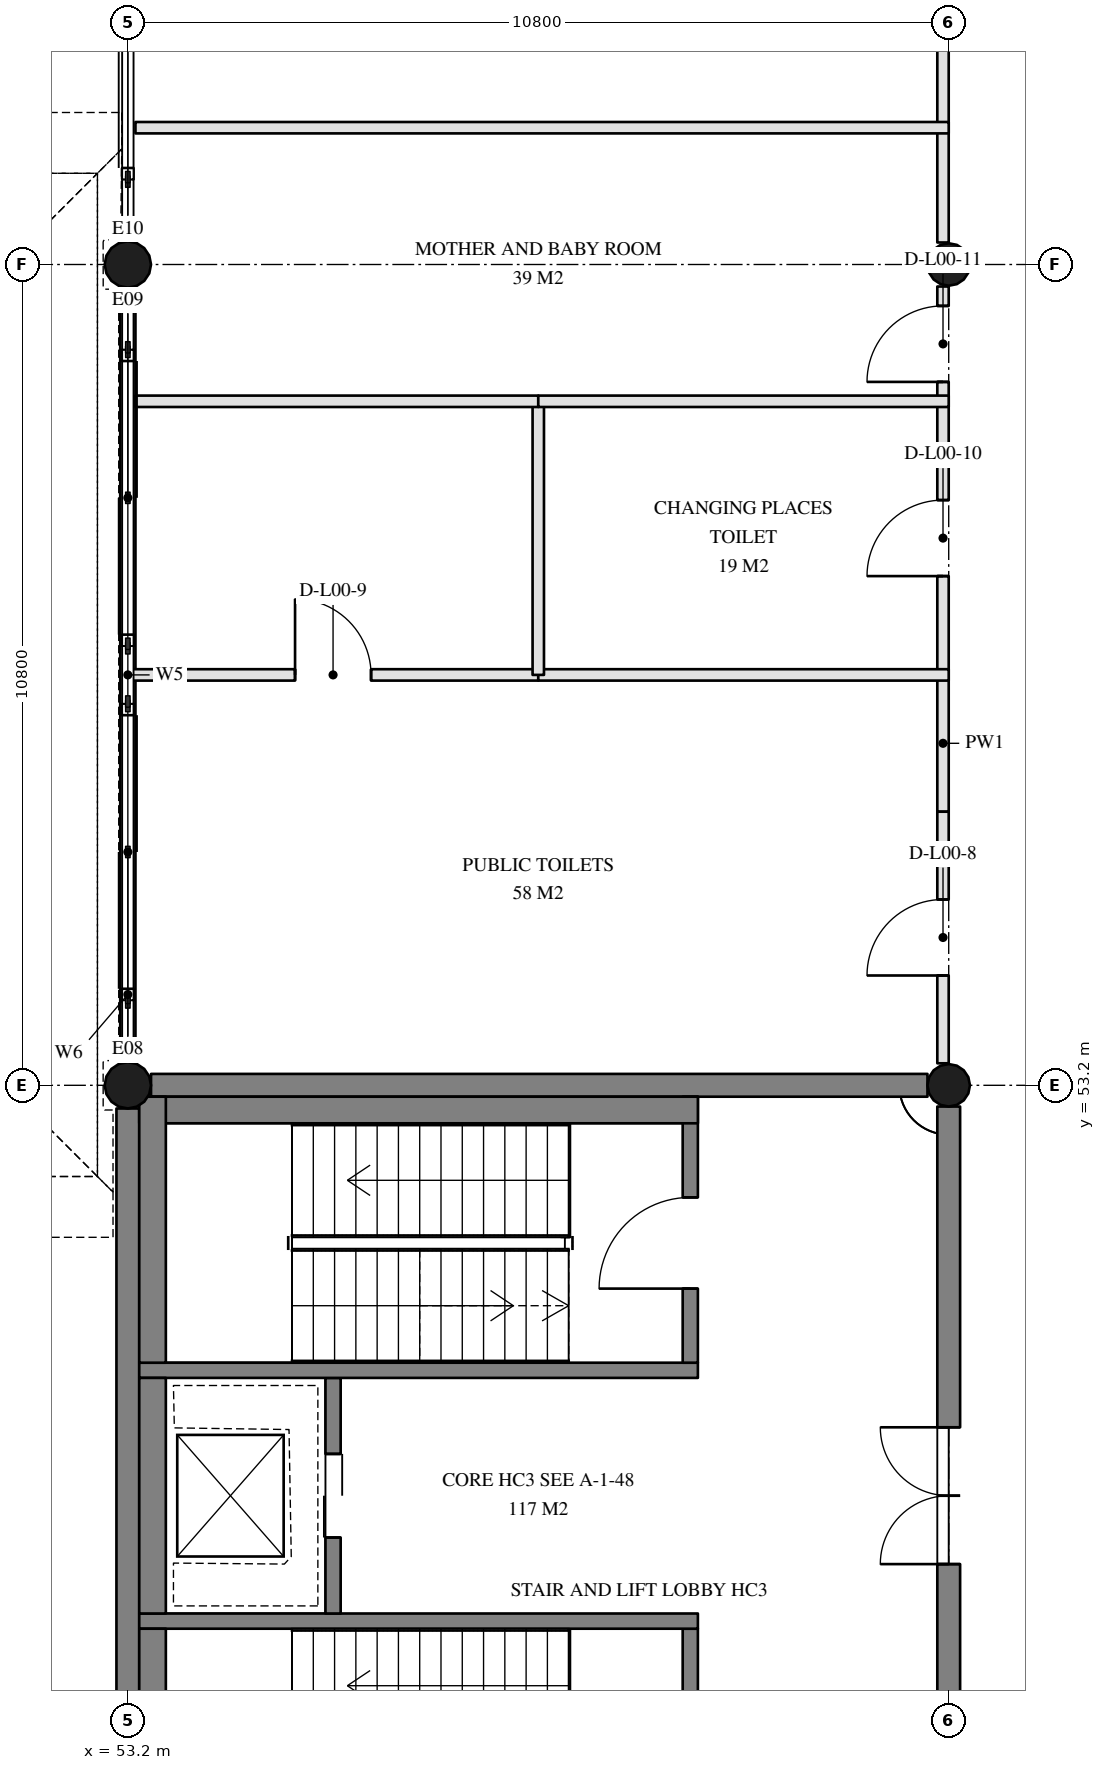
"""IFC4 building model, lengths in metres.
Left out: names, types, materials, properties, quantities, classifications, styles, units other than length and angle.
Written with IfcOpenShell. Run it as: python <this file> out.ifc"""

import sys

from ifc_helpers import new_model, si_unit, direction, frame, frame_2d, origin, origin_2d, place, context, subcontext, project, spatial, rectangle, hollow_circle, extrude, element, fill, save


model = new_model("IFC4")
c1 = context("Model", 3, precision=1e-05, world=origin(), true_north=direction((0.0, 1.0)))
c2 = subcontext(c1, "Body", "Model", "MODEL_VIEW")
j1 = project(units=[si_unit("LENGTHUNIT", "METRE"), si_unit("PLANEANGLEUNIT", "RADIAN")], contexts=[c1])
p1 = place(None, origin())
s1 = spatial("IfcSite", under=j1, at=p1, CompositionType="ELEMENT")
p2 = place(p1, origin())
s2 = spatial("IfcBuilding", under=s1, at=p2, CompositionType="ELEMENT")
p3 = place(p2, origin())
s3 = spatial("IfcBuildingStorey", under=s2, at=p3, CompositionType="ELEMENT", Elevation=0.0)
for number, where, z_axis, x_axis in (
    (1, (53.2, 53.2, 0.0), (0.0, 0.0, 1.0), (1.0, 0.0, 0.0)),
    (2, (53.2, 64.0, 0.0), (0.0, 0.0, 1.0), (1.0, 0.0, 0.0)),
):
    element("IfcColumn", number, at=place(p3, frame(where, z_axis=z_axis, x_axis=x_axis)), inside=s3, PredefinedType="COLUMN", context=c2, shape_type="SweptSolid", body=[
        extrude(hollow_circle(Radius=0.305, WallThickness=0.025, at=origin_2d()), origin(), (0.0, 0.0, 1.0), 4.8),
    ])
for number, where, z_axis, x_axis in (
    (3, (64.0, 53.2, 0.0), (0.0, 0.0, 1.0), (1.0, 0.0, 0.0)),
    (4, (64.0, 64.0, 0.0), (0.0, 0.0, 1.0), (1.0, 0.0, 0.0)),
):
    element("IfcColumn", number, at=place(p3, frame(where, z_axis=z_axis, x_axis=x_axis)), inside=s3, PredefinedType="COLUMN", context=c2, shape_type="SweptSolid", body=[
        extrude(hollow_circle(Radius=0.28, WallThickness=0.02, at=origin_2d()), origin(), (0.0, 0.0, 1.0), 4.8),
    ])
p4 = place(p3, frame((64.0, 42.705, 0.0), z_axis=(0.0, 0.0, 1.0), x_axis=(0.0, 1.0, 0.0)))
e5 = element("IfcWall", 5, at=p4, inside=s3, PredefinedType="SOLIDWALL", context=c2, shape_type="SweptSolid", body=[
    extrude(rectangle(XDim=10.215, YDim=0.3, at=frame_2d((5.108, 0.0))), origin(), (0.0, 0.0, 1.0), 4.8),
])
p5 = place(p4, frame((4.195, 0.0, 0.0)))
e6 = element("IfcOpeningElement", 6, at=p5, cuts=e5, PredefinedType="OPENING", context=c2, shape_type="SweptSolid", body=[
    extrude(rectangle(XDim=1.8, YDim=2.1, at=frame_2d((0.9, 1.05))), frame((0.0, 0.16, 0.0), z_axis=(0.0, -1.0, 0.0), x_axis=(1.0, 0.0, 0.0)), (0.0, 0.0, 1.0), 0.32),
])
p6 = place(p3, frame((63.72, 53.2, 0.0), z_axis=(0.0, 0.0, 1.0), x_axis=(-1.0, 0.0, 0.0)))
e7 = element("IfcWall", 7, at=p6, inside=s3, PredefinedType="SOLIDWALL", context=c2, shape_type="SweptSolid", body=[
    extrude(rectangle(XDim=10.216, YDim=0.3, at=frame_2d((5.108, 0.0))), origin(), (0.0, 0.0, 1.0), 4.8),
])
p7 = place(p3, frame((53.2, 52.895, 0.0), z_axis=(0.0, 0.0, 1.0), x_axis=(0.0, -1.0, 0.0)))
e8 = element("IfcWall", 8, at=p7, inside=s3, PredefinedType="SOLIDWALL", context=c2, shape_type="SweptSolid", body=[
    extrude(rectangle(XDim=10.19, YDim=0.3, at=frame_2d((5.095, 0.0))), origin(), (0.0, 0.0, 1.0), 4.8),
])
p8 = place(p3, frame((53.2, 53.48, 4.5), z_axis=(0.0, 0.0, 1.0), x_axis=(0.0, 1.0, 0.0)))
e9 = element("IfcWall", 9, at=p8, inside=s3, PredefinedType="SOLIDWALL", context=c2, shape_type="SweptSolid", body=[
    extrude(rectangle(XDim=10.24, YDim=0.2, at=frame_2d((5.12, 0.0))), origin(), (0.0, 0.0, 1.0), 0.3),
])
p9 = place(p3, frame((53.2, 54.32, 0.0), z_axis=(0.0, 0.0, 1.0), x_axis=(0.0, 1.0, 0.0)))
e10 = element("IfcWall", 10, at=p9, inside=s3, PredefinedType="SOLIDWALL", context=c2, shape_type="SweptSolid", body=[
    extrude(rectangle(XDim=3.9, YDim=0.15, at=frame_2d((1.95, 0.0))), origin(), (0.0, 0.0, 1.0), 2.6),
])
p10 = place(p9, frame((0.15, 0.0, 0.0)))
e11 = element("IfcOpeningElement", 11, at=p10, cuts=e10, PredefinedType="OPENING", context=c2, shape_type="SweptSolid", body=[
    extrude(rectangle(XDim=3.6, YDim=2.4, at=frame_2d((1.8, 1.2))), frame((0.0, 0.085, 0.0), z_axis=(0.0, -1.0, 0.0), x_axis=(1.0, 0.0, 0.0)), (0.0, 0.0, 1.0), 0.17),
])
p11 = place(p3, frame((53.2, 58.98, 0.0), z_axis=(0.0, 0.0, 1.0), x_axis=(0.0, 1.0, 0.0)))
e12 = element("IfcWall", 12, at=p11, inside=s3, PredefinedType="SOLIDWALL", context=c2, shape_type="SweptSolid", body=[
    extrude(rectangle(XDim=3.9, YDim=0.15, at=frame_2d((1.95, 0.0))), origin(), (0.0, 0.0, 1.0), 2.6),
])
p12 = place(p11, frame((0.15, 0.0, 0.0)))
e13 = element("IfcOpeningElement", 13, at=p12, cuts=e12, PredefinedType="OPENING", context=c2, shape_type="SweptSolid", body=[
    extrude(rectangle(XDim=3.6, YDim=2.4, at=frame_2d((1.8, 1.2))), frame((0.0, 0.085, 0.0), z_axis=(0.0, -1.0, 0.0), x_axis=(1.0, 0.0, 0.0)), (0.0, 0.0, 1.0), 0.17),
])
p13 = place(p3, frame((53.2, 65.12, 0.0), z_axis=(0.0, 0.0, 1.0), x_axis=(0.0, 1.0, 0.0)))
e14 = element("IfcWall", 14, at=p13, inside=s3, PredefinedType="SOLIDWALL", context=c2, shape_type="SweptSolid", body=[
    extrude(rectangle(XDim=3.9, YDim=0.15, at=frame_2d((1.95, 0.0))), origin(), (0.0, 0.0, 1.0), 2.6),
])
p14 = place(p13, frame((0.15, 0.0, 0.0)))
e15 = element("IfcOpeningElement", 15, at=p14, cuts=e14, PredefinedType="OPENING", context=c2, shape_type="SweptSolid", body=[
    extrude(rectangle(XDim=3.6, YDim=2.4, at=frame_2d((1.8, 1.2))), frame((0.0, 0.085, 0.0), z_axis=(0.0, -1.0, 0.0), x_axis=(1.0, 0.0, 0.0)), (0.0, 0.0, 1.0), 0.17),
])
p15 = place(p3, frame((60.6, 42.55, 0.0), z_axis=(0.0, 0.0, 1.0), x_axis=(0.0, 1.0, 0.0)))
e16 = element("IfcWall", 16, at=p15, inside=s3, PredefinedType="SOLIDWALL", context=c2, shape_type="SweptSolid", body=[
    extrude(rectangle(XDim=3.5, YDim=0.2, at=frame_2d((1.75, 0.0))), origin(), (0.0, 0.0, 1.0), 4.4),
])
p16 = place(p15, frame((1.325, 0.0, 0.0)))
e17 = element("IfcOpeningElement", 17, at=p16, cuts=e16, PredefinedType="OPENING", context=c2, shape_type="SweptSolid", body=[
    extrude(rectangle(XDim=1.2, YDim=2.1, at=frame_2d((0.6, 1.05))), frame((0.0, 0.11, 0.0), z_axis=(0.0, -1.0, 0.0), x_axis=(1.0, 0.0, 0.0)), (0.0, 0.0, 1.0), 0.22),
])
p17 = place(p3, frame((60.7, 46.15, 0.0), z_axis=(0.0, 0.0, 1.0), x_axis=(-1.0, 0.0, 0.0)))
e18 = element("IfcWall", 18, at=p17, inside=s3, PredefinedType="SOLIDWALL", context=c2, shape_type="SweptSolid", body=[
    extrude(rectangle(XDim=7.35, YDim=0.2, at=frame_2d((3.675, 0.0))), origin(), (0.0, 0.0, 1.0), 4.4),
])
p18 = place(p3, frame((55.9, 46.25, 0.0), z_axis=(0.0, 0.0, 1.0), x_axis=(0.0, 1.0, 0.0)))
e19 = element("IfcWall", 19, at=p18, inside=s3, PredefinedType="SOLIDWALL", context=c2, shape_type="SweptSolid", body=[
    extrude(rectangle(XDim=3.1, YDim=0.2, at=frame_2d((1.55, 0.0))), origin(), (0.0, 0.0, 1.0), 4.4),
])
p19 = place(p18, frame((1.0, 0.0, 0.0)))
e20 = element("IfcOpeningElement", 20, at=p19, cuts=e19, PredefinedType="OPENING", context=c2, shape_type="SweptSolid", body=[
    extrude(rectangle(XDim=1.1, YDim=2.1, at=frame_2d((0.55, 1.05))), frame((0.0, 0.11, 0.0), z_axis=(0.0, -1.0, 0.0), x_axis=(1.0, 0.0, 0.0)), (0.0, 0.0, 1.0), 0.22),
])
p20 = place(p3, frame((60.7, 49.45, 0.0), z_axis=(0.0, 0.0, 1.0), x_axis=(-1.0, 0.0, 0.0)))
e21 = element("IfcWall", 21, at=p20, inside=s3, PredefinedType="SOLIDWALL", context=c2, shape_type="SweptSolid", body=[
    extrude(rectangle(XDim=7.35, YDim=0.2, at=frame_2d((3.675, 0.0))), origin(), (0.0, 0.0, 1.0), 4.4),
])
p21 = place(p3, frame((60.6, 49.55, 0.0), z_axis=(0.0, 0.0, 1.0), x_axis=(0.0, 1.0, 0.0)))
e22 = element("IfcWall", 22, at=p21, inside=s3, PredefinedType="SOLIDWALL", context=c2, shape_type="SweptSolid", body=[
    extrude(rectangle(XDim=3.5, YDim=0.2, at=frame_2d((1.75, 0.0))), origin(), (0.0, 0.0, 1.0), 4.4),
])
p22 = place(p21, frame((0.975, 0.0, 0.0)))
e23 = element("IfcOpeningElement", 23, at=p22, cuts=e22, PredefinedType="OPENING", context=c2, shape_type="SweptSolid", body=[
    extrude(rectangle(XDim=1.2, YDim=2.1, at=frame_2d((0.6, 1.05))), frame((0.0, 0.11, 0.0), z_axis=(0.0, -1.0, 0.0), x_axis=(1.0, 0.0, 0.0)), (0.0, 0.0, 1.0), 0.22),
])
p23 = place(p3, frame((53.525, 42.55, -0.6), z_axis=(0.0, 0.0, 1.0), x_axis=(0.0, 1.0, 0.0)))
e24 = element("IfcWall", 24, at=p23, inside=s3, PredefinedType="SOLIDWALL", context=c2, shape_type="SweptSolid", body=[
    extrude(rectangle(XDim=3.5, YDim=0.35, at=frame_2d((1.75, 0.0))), origin(), (0.0, 0.0, 1.0), 5.0),
])
p24 = place(p3, frame((60.7, 52.875, -0.6), z_axis=(0.0, 0.0, 1.0), x_axis=(-1.0, 0.0, 0.0)))
e25 = element("IfcWall", 25, at=p24, inside=s3, PredefinedType="SOLIDWALL", context=c2, shape_type="SweptSolid", body=[
    extrude(rectangle(XDim=7.35, YDim=0.35, at=frame_2d((3.675, 0.0))), origin(), (0.0, 0.0, 1.0), 5.0),
])
p25 = place(p3, frame((53.525, 49.55, -0.6), z_axis=(0.0, 0.0, 1.0), x_axis=(0.0, 1.0, 0.0)))
e26 = element("IfcWall", 26, at=p25, inside=s3, PredefinedType="SOLIDWALL", context=c2, shape_type="SweptSolid", body=[
    extrude(rectangle(XDim=3.5, YDim=0.35, at=frame_2d((1.75, 0.0))), origin(), (0.0, 0.0, 1.0), 5.0),
])
p26 = place(p3, frame((53.525, 46.25, -0.6), z_axis=(0.0, 0.0, 1.0), x_axis=(0.0, 1.0, 0.0)))
e27 = element("IfcWall", 27, at=p26, inside=s3, PredefinedType="SOLIDWALL", context=c2, shape_type="SweptSolid", body=[
    extrude(rectangle(XDim=3.1, YDim=0.35, at=frame_2d((1.55, 0.0))), origin(), (0.0, 0.0, 1.0), 5.0),
])
p27 = place(p3, frame((63.925, 56.8, 0.0), z_axis=(0.0, 0.0, 1.0), x_axis=(0.0, 1.0, 0.0)))
e28 = element("IfcWall", 28, at=p27, inside=s3, PredefinedType="PARTITIONING", context=c2, shape_type="SweptSolid", body=[
    extrude(rectangle(XDim=1.8, YDim=0.15, at=frame_2d((0.9, 0.0))), origin(), (0.0, 0.0, 1.0), 3.9),
])
p28 = place(p3, frame((63.925, 58.6, 0.0), z_axis=(0.0, 0.0, 1.0), x_axis=(0.0, 1.0, 0.0)))
e29 = element("IfcWall", 29, at=p28, inside=s3, PredefinedType="PARTITIONING", context=c2, shape_type="SweptSolid", body=[
    extrude(rectangle(XDim=3.6, YDim=0.15, at=frame_2d((1.8, 0.0))), origin(), (0.0, 0.0, 1.0), 3.9),
])
p29 = place(p28, frame((1.3, 0.0, 0.0)))
e30 = element("IfcOpeningElement", 30, at=p29, cuts=e29, PredefinedType="OPENING", context=c2, shape_type="SweptSolid", body=[
    extrude(rectangle(XDim=1.0, YDim=2.1, at=frame_2d((0.5, 1.05))), frame((0.0, 0.085, 0.0), z_axis=(0.0, -1.0, 0.0), x_axis=(1.0, 0.0, 0.0)), (0.0, 0.0, 1.0), 0.17),
])
p30 = place(p3, frame((63.925, 62.2, 0.0), z_axis=(0.0, 0.0, 1.0), x_axis=(0.0, 1.0, 0.0)))
e31 = element("IfcWall", 31, at=p30, inside=s3, PredefinedType="PARTITIONING", context=c2, shape_type="SweptSolid", body=[
    extrude(rectangle(XDim=1.51, YDim=0.15, at=frame_2d((0.755, 0.0))), origin(), (0.0, 0.0, 1.0), 3.9),
])
p31 = place(p30, frame((0.255, 0.0, 0.0)))
e32 = element("IfcOpeningElement", 32, at=p31, cuts=e31, PredefinedType="OPENING", context=c2, shape_type="SweptSolid", body=[
    extrude(rectangle(XDim=1.0, YDim=2.1, at=frame_2d((0.5, 1.05))), frame((0.0, 0.085, 0.0), z_axis=(0.0, -1.0, 0.0), x_axis=(1.0, 0.0, 0.0)), (0.0, 0.0, 1.0), 0.17),
])
p32 = place(p3, frame((63.925, 53.49, 0.0), z_axis=(0.0, 0.0, 1.0), x_axis=(0.0, 1.0, 0.0)))
e33 = element("IfcWall", 33, at=p32, inside=s3, PredefinedType="PARTITIONING", context=c2, shape_type="SweptSolid", body=[
    extrude(rectangle(XDim=3.311, YDim=0.15, at=frame_2d((1.655, 0.0))), origin(), (0.0, 0.0, 1.0), 3.9),
])
p33 = place(p32, frame((1.155, 0.0, 0.0)))
e34 = element("IfcOpeningElement", 34, at=p33, cuts=e33, PredefinedType="OPENING", context=c2, shape_type="SweptSolid", body=[
    extrude(rectangle(XDim=1.0, YDim=2.1, at=frame_2d((0.5, 1.05))), frame((0.0, 0.085, 0.0), z_axis=(0.0, -1.0, 0.0), x_axis=(1.0, 0.0, 0.0)), (0.0, 0.0, 1.0), 0.17),
])
p34 = place(p3, frame((63.925, 64.29, 0.0), z_axis=(0.0, 0.0, 1.0), x_axis=(0.0, 1.0, 0.0)))
e35 = element("IfcWall", 35, at=p34, inside=s3, PredefinedType="PARTITIONING", context=c2, shape_type="SweptSolid", body=[
    extrude(rectangle(XDim=1.51, YDim=0.15, at=frame_2d((0.755, 0.0))), origin(), (0.0, 0.0, 1.0), 3.9),
])
p35 = place(p3, frame((63.925, 65.8, 0.0), z_axis=(0.0, 0.0, 1.0), x_axis=(0.0, 1.0, 0.0)))
e36 = element("IfcWall", 36, at=p35, inside=s3, PredefinedType="PARTITIONING", context=c2, shape_type="SweptSolid", body=[
    extrude(rectangle(XDim=8.684, YDim=0.15, at=frame_2d((4.342, 0.0))), origin(), (0.0, 0.0, 1.0), 3.9),
])
p36 = place(p35, frame((3.842, 0.0, 0.0)))
e37 = element("IfcOpeningElement", 37, at=p36, cuts=e36, PredefinedType="OPENING", context=c2, shape_type="SweptSolid", body=[
    extrude(rectangle(XDim=1.0, YDim=2.1, at=frame_2d((0.5, 1.05))), frame((0.0, 0.085, 0.0), z_axis=(0.0, -1.0, 0.0), x_axis=(1.0, 0.0, 0.0)), (0.0, 0.0, 1.0), 0.17),
])
p37 = place(p3, frame((53.2, 58.6, 0.0), z_axis=(0.0, 0.0, 1.0), x_axis=(1.0, 0.0, 0.0)))
e38 = element("IfcWall", 38, at=p37, inside=s3, PredefinedType="PARTITIONING", context=c2, shape_type="SweptSolid", body=[
    extrude(rectangle(XDim=5.4, YDim=0.15, at=frame_2d((2.7, 0.0))), origin(), (0.0, 0.0, 1.0), 3.9),
])
p38 = place(p37, frame((2.2, 0.0, 0.0)))
e39 = element("IfcOpeningElement", 39, at=p38, cuts=e38, PredefinedType="OPENING", context=c2, shape_type="SweptSolid", body=[
    extrude(rectangle(XDim=1.0, YDim=2.1, at=frame_2d((0.5, 1.05))), frame((0.0, 0.085, 0.0), z_axis=(0.0, -1.0, 0.0), x_axis=(1.0, 0.0, 0.0)), (0.0, 0.0, 1.0), 0.17),
])
p39 = place(p3, frame((58.6, 58.6, 0.0), z_axis=(0.0, 0.0, 1.0), x_axis=(1.0, 0.0, 0.0)))
e40 = element("IfcWall", 40, at=p39, inside=s3, PredefinedType="PARTITIONING", context=c2, shape_type="SweptSolid", body=[
    extrude(rectangle(XDim=5.4, YDim=0.15, at=frame_2d((2.7, 0.0))), origin(), (0.0, 0.0, 1.0), 3.9),
])
p40 = place(p3, frame((58.6, 58.6, 0.0), z_axis=(0.0, 0.0, 1.0), x_axis=(0.0, 1.0, 0.0)))
e41 = element("IfcWall", 41, at=p40, inside=s3, PredefinedType="PARTITIONING", context=c2, shape_type="SweptSolid", body=[
    extrude(rectangle(XDim=3.6, YDim=0.15, at=frame_2d((1.8, 0.0))), origin(), (0.0, 0.0, 1.0), 4.4),
])
p41 = place(p3, frame((53.3, 62.2, 0.0), z_axis=(0.0, 0.0, 1.0), x_axis=(1.0, 0.0, 0.0)))
e42 = element("IfcWall", 42, at=p41, inside=s3, PredefinedType="PARTITIONING", context=c2, shape_type="SweptSolid", body=[
    extrude(rectangle(XDim=5.3, YDim=0.15, at=frame_2d((2.65, 0.0))), origin(), (0.0, 0.0, 1.0), 3.9),
])
p42 = place(p3, frame((58.6, 62.2, 0.0), z_axis=(0.0, 0.0, 1.0), x_axis=(1.0, 0.0, 0.0)))
e43 = element("IfcWall", 43, at=p42, inside=s3, PredefinedType="PARTITIONING", context=c2, shape_type="SweptSolid", body=[
    extrude(rectangle(XDim=5.4, YDim=0.15, at=frame_2d((2.7, 0.0))), origin(), (0.0, 0.0, 1.0), 3.9),
])
p43 = place(p3, frame((53.3, 65.8, 0.0), z_axis=(0.0, 0.0, 1.0), x_axis=(1.0, 0.0, 0.0)))
e44 = element("IfcWall", 44, at=p43, inside=s3, PredefinedType="PARTITIONING", context=c2, shape_type="SweptSolid", body=[
    extrude(rectangle(XDim=10.7, YDim=0.15, at=frame_2d((5.35, 0.0))), origin(), (0.0, 0.0, 1.0), 3.9),
])
p44 = place(p10, origin())
e45 = element("IfcDoor", 45, at=p44, inside=s3, OperationType="DOUBLE_DOOR_SLIDING", PredefinedType="DOOR", context=c2, shape_type="SweptSolid", body=[
    extrude(rectangle(XDim=3.6, YDim=2.4, at=frame_2d((1.8, 1.2))), frame((0.0, 0.025, 0.0), z_axis=(0.0, -1.0, 0.0), x_axis=(1.0, 0.0, 0.0)), (0.0, 0.0, 1.0), 0.05),
])
fill(e11, e45)
p45 = place(p12, origin())
e46 = element("IfcDoor", 46, at=p45, inside=s3, OperationType="DOUBLE_DOOR_SLIDING", PredefinedType="DOOR", context=c2, shape_type="SweptSolid", body=[
    extrude(rectangle(XDim=3.6, YDim=2.4, at=frame_2d((1.8, 1.2))), frame((0.0, 0.025, 0.0), z_axis=(0.0, -1.0, 0.0), x_axis=(1.0, 0.0, 0.0)), (0.0, 0.0, 1.0), 0.05),
])
fill(e13, e46)
p46 = place(p14, origin())
e47 = element("IfcDoor", 47, at=p46, inside=s3, OperationType="DOUBLE_DOOR_SLIDING", PredefinedType="DOOR", context=c2, shape_type="SweptSolid", body=[
    extrude(rectangle(XDim=3.6, YDim=2.4, at=frame_2d((1.8, 1.2))), frame((0.0, 0.025, 0.0), z_axis=(0.0, -1.0, 0.0), x_axis=(1.0, 0.0, 0.0)), (0.0, 0.0, 1.0), 0.05),
])
fill(e15, e47)
p47 = place(p19, frame((1.1, 0.0, 0.0), z_axis=(0.0, 0.0, 1.0), x_axis=(-1.0, 0.0, 0.0)))
e48 = element("IfcDoor", 48, at=p47, inside=s3, OperationType="DOUBLE_DOOR_SLIDING", PredefinedType="DOOR", context=c2, shape_type="SweptSolid", body=[
    extrude(rectangle(XDim=1.1, YDim=2.1, at=frame_2d((0.55, 1.05))), frame((0.0, 0.025, 0.0), z_axis=(0.0, -1.0, 0.0), x_axis=(1.0, 0.0, 0.0)), (0.0, 0.0, 1.0), 0.05),
])
fill(e20, e48)
p48 = place(p22, frame((1.2, 0.0, 0.0), z_axis=(0.0, 0.0, 1.0), x_axis=(-1.0, 0.0, 0.0)))
e49 = element("IfcDoor", 49, at=p48, inside=s3, OperationType="SINGLE_SWING_RIGHT", PredefinedType="DOOR", context=c2, shape_type="SweptSolid", body=[
    extrude(rectangle(XDim=1.2, YDim=2.1, at=frame_2d((0.6, 1.05))), frame((0.0, 0.025, 0.0), z_axis=(0.0, -1.0, 0.0), x_axis=(1.0, 0.0, 0.0)), (0.0, 0.0, 1.0), 0.05),
])
fill(e23, e49)
p49 = place(p5, frame((1.8, 0.0, 0.0), z_axis=(0.0, 0.0, 1.0), x_axis=(-1.0, 0.0, 0.0)))
e50 = element("IfcDoor", 50, at=p49, inside=s3, OperationType="DOUBLE_DOOR_DOUBLE_SWING", PredefinedType="DOOR", context=c2, shape_type="SweptSolid", body=[
    extrude(rectangle(XDim=1.8, YDim=2.1, at=frame_2d((0.9, 1.05))), frame((0.0, 0.025, 0.0), z_axis=(0.0, -1.0, 0.0), x_axis=(1.0, 0.0, 0.0)), (0.0, 0.0, 1.0), 0.05),
])
fill(e6, e50)
p50 = place(p33, origin())
e51 = element("IfcDoor", 51, at=p50, inside=s3, OperationType="SINGLE_SWING_LEFT", PredefinedType="DOOR", context=c2, shape_type="SweptSolid", body=[
    extrude(rectangle(XDim=1.0, YDim=2.1, at=frame_2d((0.5, 1.05))), frame((0.0, 0.025, 0.0), z_axis=(0.0, -1.0, 0.0), x_axis=(1.0, 0.0, 0.0)), (0.0, 0.0, 1.0), 0.05),
])
fill(e34, e51)
p51 = place(p38, origin())
e52 = element("IfcDoor", 52, at=p51, inside=s3, OperationType="SINGLE_SWING_RIGHT", PredefinedType="DOOR", context=c2, shape_type="SweptSolid", body=[
    extrude(rectangle(XDim=1.0, YDim=2.1, at=frame_2d((0.5, 1.05))), frame((0.0, 0.025, 0.0), z_axis=(0.0, -1.0, 0.0), x_axis=(1.0, 0.0, 0.0)), (0.0, 0.0, 1.0), 0.05),
])
fill(e39, e52)
p52 = place(p29, origin())
e53 = element("IfcDoor", 53, at=p52, inside=s3, OperationType="SINGLE_SWING_RIGHT", PredefinedType="DOOR", context=c2, shape_type="SweptSolid", body=[
    extrude(rectangle(XDim=1.0, YDim=2.1, at=frame_2d((0.5, 1.05))), frame((0.0, 0.025, 0.0), z_axis=(0.0, -1.0, 0.0), x_axis=(1.0, 0.0, 0.0)), (0.0, 0.0, 1.0), 0.05),
])
fill(e30, e53)
p53 = place(p31, origin())
e54 = element("IfcDoor", 54, at=p53, inside=s3, OperationType="SINGLE_SWING_LEFT", PredefinedType="DOOR", context=c2, shape_type="SweptSolid", body=[
    extrude(rectangle(XDim=1.0, YDim=2.1, at=frame_2d((0.5, 1.05))), frame((0.0, 0.025, 0.0), z_axis=(0.0, -1.0, 0.0), x_axis=(1.0, 0.0, 0.0)), (0.0, 0.0, 1.0), 0.05),
])
fill(e32, e54)
save(model, sys.argv[1])
